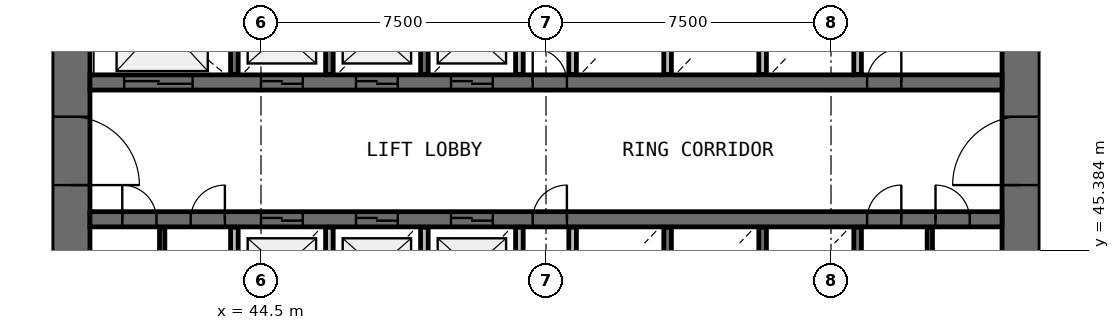
"""IFC4 building model, lengths in metres.
Left out: names, types, materials, properties, quantities, classifications, styles, units other than length and angle.
Written with IfcOpenShell. Run it as: python <this file> out.ifc"""

import sys

from ifc_helpers import new_model, si_unit, direction, frame, frame_2d, origin, place, context, subcontext, project, spatial, rectangle, extrude, source, transform, mapped, element, fill, save


model = new_model("IFC4")
c1 = context("Model", 3, precision=1e-05, world=origin(), true_north=direction((0.0, 1.0)))
c2 = subcontext(c1, "Body", "Model", "MODEL_VIEW")
j1 = project(units=[si_unit("LENGTHUNIT", "METRE"), si_unit("PLANEANGLEUNIT", "RADIAN")], contexts=[c1])
p1 = place(None, origin())
s1 = spatial("IfcSite", under=j1, at=p1, CompositionType="ELEMENT")
p2 = place(p1, origin())
s2 = spatial("IfcBuilding", under=s1, at=p2, CompositionType="ELEMENT")
p3 = place(p2, frame((0.0, 0.0, 27.0)))
s3 = spatial("IfcBuildingStorey", under=s2, at=p3, CompositionType="ELEMENT", Elevation=27.0)
p4 = place(p3, frame((64.5, 38.0, 0.0), z_axis=(0.0, 0.0, 1.0), x_axis=(0.0, 1.0, 0.0)))
e1 = element("IfcWall", 1, at=p4, inside=s3, PredefinedType="SHEAR", context=c2, shape_type="SweptSolid", body=[
    extrude(rectangle(XDim=20.0, YDim=1.0, at=frame_2d((10.0, 0.0))), origin(), (0.0, 0.0, 1.0), 4.4),
])
p5 = place(p4, frame((9.1, 0.0, 0.0)))
e2 = element("IfcOpeningElement", 2, at=p5, cuts=e1, PredefinedType="OPENING", context=c2, shape_type="SweptSolid", body=[
    extrude(rectangle(XDim=1.8, YDim=2.1, at=frame_2d((0.9, 1.05))), frame((0.0, 0.51, 0.0), z_axis=(0.0, -1.0, 0.0), x_axis=(1.0, 0.0, 0.0)), (0.0, 0.0, 1.0), 1.02),
])
p6 = place(p3, frame((39.5, 58.0, 0.0), z_axis=(0.0, 0.0, 1.0), x_axis=(0.0, -1.0, 0.0)))
e3 = element("IfcWall", 3, at=p6, inside=s3, PredefinedType="SHEAR", context=c2, shape_type="SweptSolid", body=[
    extrude(rectangle(XDim=20.0, YDim=1.0, at=frame_2d((10.0, 0.0))), origin(), (0.0, 0.0, 1.0), 4.4),
])
p7 = place(p6, frame((9.1, 0.0, 0.0)))
e4 = element("IfcOpeningElement", 4, at=p7, cuts=e3, PredefinedType="OPENING", context=c2, shape_type="SweptSolid", body=[
    extrude(rectangle(XDim=1.8, YDim=2.1, at=frame_2d((0.9, 1.05))), frame((0.0, 0.51, 0.0), z_axis=(0.0, -1.0, 0.0), x_axis=(1.0, 0.0, 0.0)), (0.0, 0.0, 1.0), 1.02),
])
p8 = place(p3, frame((40.0, 49.8, 0.0), z_axis=(0.0, 0.0, 1.0), x_axis=(1.0, 0.0, 0.0)))
e5 = element("IfcWall", 5, at=p8, inside=s3, PredefinedType="SHEAR", context=c2, shape_type="SweptSolid", body=[
    extrude(rectangle(XDim=24.0, YDim=0.4, at=frame_2d((12.0, 0.0))), origin(), (0.0, 0.0, 1.0), 4.4),
])
p9 = place(p8, frame((4.5, 0.0, 0.0)))
e6 = element("IfcOpeningElement", 6, at=p9, cuts=e5, PredefinedType="OPENING", context=c2, shape_type="SweptSolid", body=[
    extrude(rectangle(XDim=1.1, YDim=2.1, at=frame_2d((0.55, 1.05))), frame((0.0, 0.21, 0.0), z_axis=(0.0, -1.0, 0.0), x_axis=(1.0, 0.0, 0.0)), (0.0, 0.0, 1.0), 0.42),
])
p10 = place(p8, frame((7.0, 0.0, 0.0)))
e7 = element("IfcOpeningElement", 7, at=p10, cuts=e5, PredefinedType="OPENING", context=c2, shape_type="SweptSolid", body=[
    extrude(rectangle(XDim=1.1, YDim=2.1, at=frame_2d((0.55, 1.05))), frame((0.0, 0.21, 0.0), z_axis=(0.0, -1.0, 0.0), x_axis=(1.0, 0.0, 0.0)), (0.0, 0.0, 1.0), 0.42),
])
p11 = place(p8, frame((9.5, 0.0, 0.0)))
e8 = element("IfcOpeningElement", 8, at=p11, cuts=e5, PredefinedType="OPENING", context=c2, shape_type="SweptSolid", body=[
    extrude(rectangle(XDim=1.1, YDim=2.1, at=frame_2d((0.55, 1.05))), frame((0.0, 0.21, 0.0), z_axis=(0.0, -1.0, 0.0), x_axis=(1.0, 0.0, 0.0)), (0.0, 0.0, 1.0), 0.42),
])
p12 = place(p8, frame((0.9, 0.0, 0.0)))
e9 = element("IfcOpeningElement", 9, at=p12, cuts=e5, PredefinedType="OPENING", context=c2, shape_type="SweptSolid", body=[
    extrude(rectangle(XDim=1.8, YDim=2.4, at=frame_2d((0.9, 1.2))), frame((0.0, 0.21, 0.0), z_axis=(0.0, -1.0, 0.0), x_axis=(1.0, 0.0, 0.0)), (0.0, 0.0, 1.0), 0.42),
])
p13 = place(p8, frame((20.45, 0.0, 0.0)))
e10 = element("IfcOpeningElement", 10, at=p13, cuts=e5, PredefinedType="OPENING", context=c2, shape_type="SweptSolid", body=[
    extrude(rectangle(XDim=0.9, YDim=2.1, at=frame_2d((0.45, 1.05))), frame((0.0, 0.21, 0.0), z_axis=(0.0, -1.0, 0.0), x_axis=(1.0, 0.0, 0.0)), (0.0, 0.0, 1.0), 0.42),
])
p14 = place(p8, frame((11.65, 0.0, 0.0)))
e11 = element("IfcOpeningElement", 11, at=p14, cuts=e5, PredefinedType="OPENING", context=c2, shape_type="SweptSolid", body=[
    extrude(rectangle(XDim=0.9, YDim=2.1, at=frame_2d((0.45, 1.05))), frame((0.0, 0.21, 0.0), z_axis=(0.0, -1.0, 0.0), x_axis=(1.0, 0.0, 0.0)), (0.0, 0.0, 1.0), 0.42),
])
p15 = place(p3, frame((40.0, 46.2, 0.0), z_axis=(0.0, 0.0, 1.0), x_axis=(1.0, 0.0, 0.0)))
e12 = element("IfcWall", 12, at=p15, inside=s3, PredefinedType="SHEAR", context=c2, shape_type="SweptSolid", body=[
    extrude(rectangle(XDim=24.0, YDim=0.4, at=frame_2d((12.0, 0.0))), origin(), (0.0, 0.0, 1.0), 4.4),
])
p16 = place(p15, frame((4.5, 0.0, 0.0)))
e13 = element("IfcOpeningElement", 13, at=p16, cuts=e12, PredefinedType="OPENING", context=c2, shape_type="SweptSolid", body=[
    extrude(rectangle(XDim=1.1, YDim=2.1, at=frame_2d((0.55, 1.05))), frame((0.0, 0.21, 0.0), z_axis=(0.0, -1.0, 0.0), x_axis=(1.0, 0.0, 0.0)), (0.0, 0.0, 1.0), 0.42),
])
p17 = place(p15, frame((7.0, 0.0, 0.0)))
e14 = element("IfcOpeningElement", 14, at=p17, cuts=e12, PredefinedType="OPENING", context=c2, shape_type="SweptSolid", body=[
    extrude(rectangle(XDim=1.1, YDim=2.1, at=frame_2d((0.55, 1.05))), frame((0.0, 0.21, 0.0), z_axis=(0.0, -1.0, 0.0), x_axis=(1.0, 0.0, 0.0)), (0.0, 0.0, 1.0), 0.42),
])
p18 = place(p15, frame((9.5, 0.0, 0.0)))
e15 = element("IfcOpeningElement", 15, at=p18, cuts=e12, PredefinedType="OPENING", context=c2, shape_type="SweptSolid", body=[
    extrude(rectangle(XDim=1.1, YDim=2.1, at=frame_2d((0.55, 1.05))), frame((0.0, 0.21, 0.0), z_axis=(0.0, -1.0, 0.0), x_axis=(1.0, 0.0, 0.0)), (0.0, 0.0, 1.0), 0.42),
])
p19 = place(p15, frame((20.45, 0.0, 0.0)))
e16 = element("IfcOpeningElement", 16, at=p19, cuts=e12, PredefinedType="OPENING", context=c2, shape_type="SweptSolid", body=[
    extrude(rectangle(XDim=0.9, YDim=2.1, at=frame_2d((0.45, 1.05))), frame((0.0, 0.21, 0.0), z_axis=(0.0, -1.0, 0.0), x_axis=(1.0, 0.0, 0.0)), (0.0, 0.0, 1.0), 0.42),
])
p20 = place(p15, frame((22.25, 0.0, 0.0)))
e17 = element("IfcOpeningElement", 17, at=p20, cuts=e12, PredefinedType="OPENING", context=c2, shape_type="SweptSolid", body=[
    extrude(rectangle(XDim=0.9, YDim=2.1, at=frame_2d((0.45, 1.05))), frame((0.0, 0.21, 0.0), z_axis=(0.0, -1.0, 0.0), x_axis=(1.0, 0.0, 0.0)), (0.0, 0.0, 1.0), 0.42),
])
p21 = place(p15, frame((0.85, 0.0, 0.0)))
e18 = element("IfcOpeningElement", 18, at=p21, cuts=e12, PredefinedType="OPENING", context=c2, shape_type="SweptSolid", body=[
    extrude(rectangle(XDim=0.9, YDim=2.1, at=frame_2d((0.45, 1.05))), frame((0.0, 0.21, 0.0), z_axis=(0.0, -1.0, 0.0), x_axis=(1.0, 0.0, 0.0)), (0.0, 0.0, 1.0), 0.42),
])
p22 = place(p15, frame((2.65, 0.0, 0.0)))
e19 = element("IfcOpeningElement", 19, at=p22, cuts=e12, PredefinedType="OPENING", context=c2, shape_type="SweptSolid", body=[
    extrude(rectangle(XDim=0.9, YDim=2.1, at=frame_2d((0.45, 1.05))), frame((0.0, 0.21, 0.0), z_axis=(0.0, -1.0, 0.0), x_axis=(1.0, 0.0, 0.0)), (0.0, 0.0, 1.0), 0.42),
])
p23 = place(p15, frame((11.65, 0.0, 0.0)))
e20 = element("IfcOpeningElement", 20, at=p23, cuts=e12, PredefinedType="OPENING", context=c2, shape_type="SweptSolid", body=[
    extrude(rectangle(XDim=0.9, YDim=2.1, at=frame_2d((0.45, 1.05))), frame((0.0, 0.21, 0.0), z_axis=(0.0, -1.0, 0.0), x_axis=(1.0, 0.0, 0.0)), (0.0, 0.0, 1.0), 0.42),
])
for number, where, z_axis, x_axis in (
    (21, (43.8, 45.99, 0.0), (0.0, 0.0, 1.0), (0.0, -1.0, 0.0)),
    (22, (43.8, 52.37, 0.0), (0.0, 0.0, 1.0), (0.0, -1.0, 0.0)),
):
    element("IfcWall", number, at=place(p3, frame(where, z_axis=z_axis, x_axis=x_axis)), inside=s3, PredefinedType="SOLIDWALL", context=c2, shape_type="SweptSolid", body=[
        extrude(rectangle(XDim=2.36, YDim=0.2, at=frame_2d((1.18, 0.0))), origin(), (0.0, 0.0, 1.0), 3.95),
    ])
p24 = place(p3, frame((46.3, 43.6, 0.0), z_axis=(0.0, 0.0, 1.0), x_axis=(0.0, 1.0, 0.0)))
e23 = element("IfcWall", 23, at=p24, inside=s3, PredefinedType="SOLIDWALL", context=c2, shape_type="SweptSolid", body=[
    extrude(rectangle(XDim=2.39, YDim=0.2, at=frame_2d((1.195, 0.0))), origin(), (0.0, 0.0, 1.0), 3.95),
])
for number, where, z_axis, x_axis in (
    (24, (46.3, 50.01, 0.0), (0.0, 0.0, 1.0), (0.0, 1.0, 0.0)),
    (25, (48.8, 43.63, 0.0), (0.0, 0.0, 1.0), (0.0, 1.0, 0.0)),
    (26, (48.8, 50.01, 0.0), (0.0, 0.0, 1.0), (0.0, 1.0, 0.0)),
    (27, (51.3, 43.63, 0.0), (0.0, 0.0, 1.0), (0.0, 1.0, 0.0)),
):
    element("IfcWall", number, at=place(p3, frame(where, z_axis=z_axis, x_axis=x_axis)), inside=s3, PredefinedType="SOLIDWALL", context=c2, shape_type="SweptSolid", body=[
        extrude(rectangle(XDim=2.36, YDim=0.2, at=frame_2d((1.18, 0.0))), origin(), (0.0, 0.0, 1.0), 3.95),
    ])
for number, where, z_axis, x_axis in (
    (28, (51.3, 50.01, 0.0), (0.0, 0.0, 1.0), (0.0, 1.0, 0.0)),
    (29, (52.7, 45.99, 0.0), (0.0, 0.0, 1.0), (0.0, -1.0, 0.0)),
):
    element("IfcWall", number, at=place(p3, frame(where, z_axis=z_axis, x_axis=x_axis)), inside=s3, PredefinedType="SOLIDWALL", context=c2, shape_type="SweptSolid", body=[
        extrude(rectangle(XDim=2.39, YDim=0.2, at=frame_2d((1.195, 0.0))), origin(), (0.0, 0.0, 1.0), 3.95),
    ])
for number, where, z_axis, x_axis in (
    (30, (52.7, 52.37, 0.0), (0.0, 0.0, 1.0), (0.0, -1.0, 0.0)),
    (31, (55.2, 43.63, 0.0), (0.0, 0.0, 1.0), (0.0, 1.0, 0.0)),
    (32, (55.2, 50.01, 0.0), (0.0, 0.0, 1.0), (0.0, 1.0, 0.0)),
    (33, (57.7, 43.63, 0.0), (0.0, 0.0, 1.0), (0.0, 1.0, 0.0)),
):
    element("IfcWall", number, at=place(p3, frame(where, z_axis=z_axis, x_axis=x_axis)), inside=s3, PredefinedType="SOLIDWALL", context=c2, shape_type="SweptSolid", body=[
        extrude(rectangle(XDim=2.36, YDim=0.2, at=frame_2d((1.18, 0.0))), origin(), (0.0, 0.0, 1.0), 3.95),
    ])
p25 = place(p3, frame((57.7, 50.01, 0.0), z_axis=(0.0, 0.0, 1.0), x_axis=(0.0, 1.0, 0.0)))
e34 = element("IfcWall", 34, at=p25, inside=s3, PredefinedType="SOLIDWALL", context=c2, shape_type="SweptSolid", body=[
    extrude(rectangle(XDim=2.39, YDim=0.2, at=frame_2d((1.195, 0.0))), origin(), (0.0, 0.0, 1.0), 3.95),
])
for number, where, z_axis, x_axis in (
    (35, (60.2, 43.63, 0.0), (0.0, 0.0, 1.0), (0.0, 1.0, 0.0)),
    (36, (60.2, 50.01, 0.0), (0.0, 0.0, 1.0), (0.0, 1.0, 0.0)),
):
    element("IfcWall", number, at=place(p3, frame(where, z_axis=z_axis, x_axis=x_axis)), inside=s3, PredefinedType="SOLIDWALL", context=c2, shape_type="SweptSolid", body=[
        extrude(rectangle(XDim=2.36, YDim=0.2, at=frame_2d((1.18, 0.0))), origin(), (0.0, 0.0, 1.0), 3.95),
    ])
for number, where, z_axis, x_axis in (
    (37, (41.9, 43.6, 0.0), (0.0, 0.0, 1.0), (0.0, 1.0, 0.0)),
    (38, (62.1, 43.6, 0.0), (0.0, 0.0, 1.0), (0.0, 1.0, 0.0)),
):
    element("IfcWall", number, at=place(p3, frame(where, z_axis=z_axis, x_axis=x_axis)), inside=s3, PredefinedType="PARTITIONING", context=c2, shape_type="SweptSolid", body=[
        extrude(rectangle(XDim=2.39, YDim=0.14, at=frame_2d((1.195, 0.0))), origin(), (0.0, 0.0, 1.0), 3.05),
    ])
m1 = source(origin(), c2, "Body", "SweptSolid", [
    extrude(rectangle(XDim=1.8, YDim=2.1, at=frame_2d((0.9, 1.05))), frame((0.0, 0.025, 0.0), z_axis=(0.0, -1.0, 0.0), x_axis=(1.0, 0.0, 0.0)), (0.0, 0.0, 1.0), 0.05),
])
p26 = place(p7, origin())
e39 = element("IfcDoor", 39, at=p26, inside=s3, OperationType="SINGLE_SWING_RIGHT", PredefinedType="DOOR", context=c2, shape_type="MappedRepresentation", body=[
    mapped(m1, transform((0.0, 0.0, 0.0), scale=1.0)),
])
fill(e4, e39)
p27 = place(p5, origin())
e40 = element("IfcDoor", 40, at=p27, inside=s3, OperationType="SINGLE_SWING_LEFT", PredefinedType="DOOR", context=c2, shape_type="MappedRepresentation", body=[
    mapped(m1, transform((0.0, 0.0, 0.0), scale=1.0)),
])
fill(e2, e40)
m2 = source(origin(), c2, "Body", "SweptSolid", [
    extrude(rectangle(XDim=1.1, YDim=2.1, at=frame_2d((0.55, 1.05))), frame((0.0, 0.025, 0.0), z_axis=(0.0, -1.0, 0.0), x_axis=(1.0, 0.0, 0.0)), (0.0, 0.0, 1.0), 0.05),
])
p28 = place(p9, origin())
e41 = element("IfcDoor", 41, at=p28, inside=s3, OperationType="DOUBLE_DOOR_SLIDING", PredefinedType="USERDEFINED", context=c2, shape_type="MappedRepresentation", body=[
    mapped(m2, transform((0.0, 0.0, 0.0), scale=1.0)),
])
fill(e6, e41)
p29 = place(p10, origin())
e42 = element("IfcDoor", 42, at=p29, inside=s3, OperationType="DOUBLE_DOOR_SLIDING", PredefinedType="USERDEFINED", context=c2, shape_type="MappedRepresentation", body=[
    mapped(m2, transform((0.0, 0.0, 0.0), scale=1.0)),
])
fill(e7, e42)
p30 = place(p11, origin())
e43 = element("IfcDoor", 43, at=p30, inside=s3, OperationType="DOUBLE_DOOR_SLIDING", PredefinedType="USERDEFINED", context=c2, shape_type="MappedRepresentation", body=[
    mapped(m2, transform((0.0, 0.0, 0.0), scale=1.0)),
])
fill(e8, e43)
p31 = place(p16, origin())
e44 = element("IfcDoor", 44, at=p31, inside=s3, OperationType="DOUBLE_DOOR_SLIDING", PredefinedType="USERDEFINED", context=c2, shape_type="MappedRepresentation", body=[
    mapped(m2, transform((0.0, 0.0, 0.0), scale=1.0)),
])
fill(e13, e44)
p32 = place(p17, origin())
e45 = element("IfcDoor", 45, at=p32, inside=s3, OperationType="DOUBLE_DOOR_SLIDING", PredefinedType="USERDEFINED", context=c2, shape_type="MappedRepresentation", body=[
    mapped(m2, transform((0.0, 0.0, 0.0), scale=1.0)),
])
fill(e14, e45)
p33 = place(p18, origin())
e46 = element("IfcDoor", 46, at=p33, inside=s3, OperationType="DOUBLE_DOOR_SLIDING", PredefinedType="USERDEFINED", context=c2, shape_type="MappedRepresentation", body=[
    mapped(m2, transform((0.0, 0.0, 0.0), scale=1.0)),
])
fill(e15, e46)
m3 = source(origin(), c2, "Body", "SweptSolid", [
    extrude(rectangle(XDim=1.8, YDim=2.4, at=frame_2d((0.9, 1.2))), frame((0.0, 0.025, 0.0), z_axis=(0.0, -1.0, 0.0), x_axis=(1.0, 0.0, 0.0)), (0.0, 0.0, 1.0), 0.05),
])
p34 = place(p12, origin())
e47 = element("IfcDoor", 47, at=p34, inside=s3, OperationType="DOUBLE_DOOR_SLIDING", PredefinedType="USERDEFINED", context=c2, shape_type="MappedRepresentation", body=[
    mapped(m3, transform((0.0, 0.0, 0.0), scale=1.0)),
])
fill(e9, e47)
m4 = source(origin(), c2, "Body", "SweptSolid", [
    extrude(rectangle(XDim=0.9, YDim=2.1, at=frame_2d((0.45, 1.05))), frame((0.0, 0.025, 0.0), z_axis=(0.0, -1.0, 0.0), x_axis=(1.0, 0.0, 0.0)), (0.0, 0.0, 1.0), 0.05),
])
p35 = place(p19, origin())
e48 = element("IfcDoor", 48, at=p35, inside=s3, OperationType="SINGLE_SWING_RIGHT", PredefinedType="DOOR", context=c2, shape_type="MappedRepresentation", body=[
    mapped(m4, transform((0.0, 0.0, 0.0), scale=1.0)),
])
fill(e16, e48)
p36 = place(p20, origin())
e49 = element("IfcDoor", 49, at=p36, inside=s3, OperationType="SINGLE_SWING_LEFT", PredefinedType="DOOR", context=c2, shape_type="MappedRepresentation", body=[
    mapped(m4, transform((0.0, 0.0, 0.0), scale=1.0)),
])
fill(e17, e49)
p37 = place(p13, origin())
e50 = element("IfcDoor", 50, at=p37, inside=s3, OperationType="SINGLE_SWING_RIGHT", PredefinedType="DOOR", context=c2, shape_type="MappedRepresentation", body=[
    mapped(m4, transform((0.0, 0.0, 0.0), scale=1.0)),
])
fill(e10, e50)
p38 = place(p21, origin())
e51 = element("IfcDoor", 51, at=p38, inside=s3, OperationType="SINGLE_SWING_LEFT", PredefinedType="DOOR", context=c2, shape_type="MappedRepresentation", body=[
    mapped(m4, transform((0.0, 0.0, 0.0), scale=1.0)),
])
fill(e18, e51)
p39 = place(p22, origin())
e52 = element("IfcDoor", 52, at=p39, inside=s3, OperationType="SINGLE_SWING_RIGHT", PredefinedType="DOOR", context=c2, shape_type="MappedRepresentation", body=[
    mapped(m4, transform((0.0, 0.0, 0.0), scale=1.0)),
])
fill(e19, e52)
p40 = place(p14, origin())
e53 = element("IfcDoor", 53, at=p40, inside=s3, OperationType="SINGLE_SWING_LEFT", PredefinedType="DOOR", context=c2, shape_type="MappedRepresentation", body=[
    mapped(m4, transform((0.0, 0.0, 0.0), scale=1.0)),
])
fill(e11, e53)
p41 = place(p23, origin())
e54 = element("IfcDoor", 54, at=p41, inside=s3, OperationType="SINGLE_SWING_RIGHT", PredefinedType="DOOR", context=c2, shape_type="MappedRepresentation", body=[
    mapped(m4, transform((0.0, 0.0, 0.0), scale=1.0)),
])
fill(e20, e54)
save(model, sys.argv[1])
